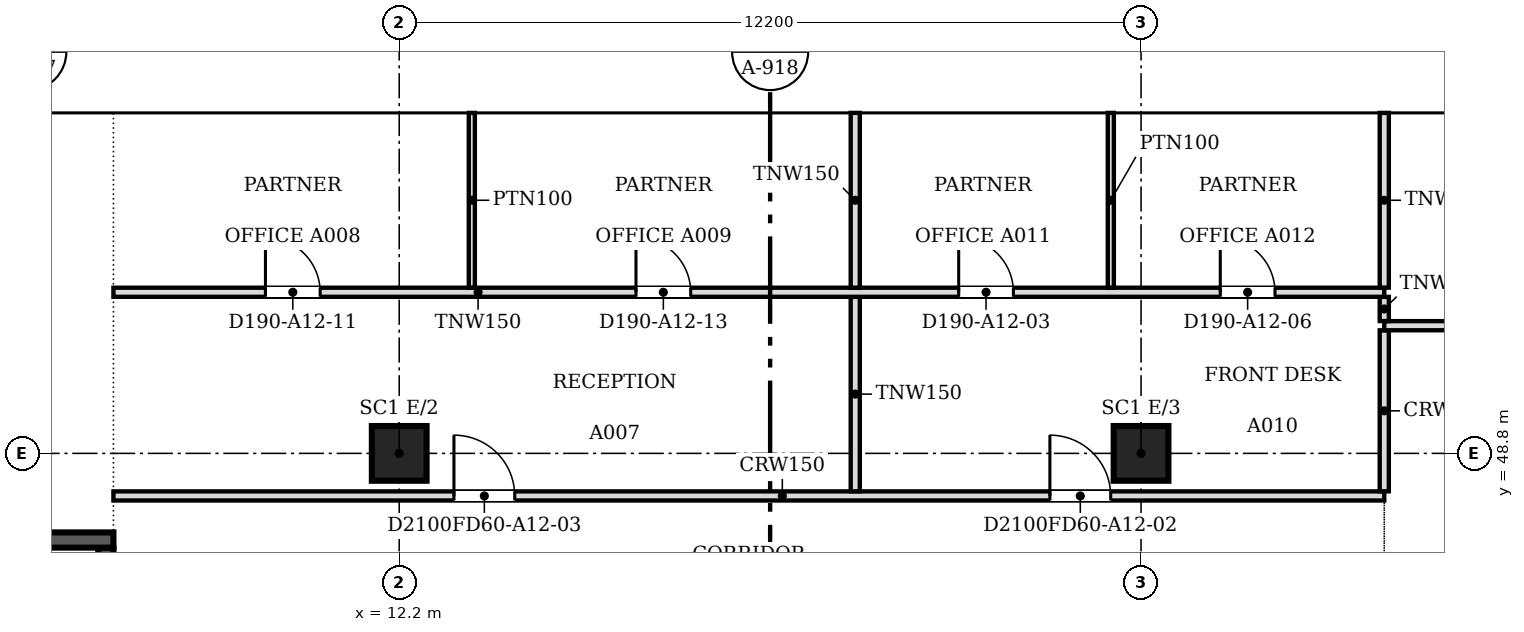
"""IFC4 building model, lengths in metres.
Left out: names, types, materials, properties, quantities, classifications, styles, units other than length and angle.
Written with IfcOpenShell. Run it as: python <this file> out.ifc"""

import sys

from ifc_helpers import new_model, si_unit, direction, frame, frame_2d, origin, origin_2d, place, context, subcontext, project, spatial, polyline, rectangle, outline, extrude, faceted_brep, source, transform, mapped, element, fill, save


model = new_model("IFC4")
c1 = context("Model", 3, precision=1e-05, world=origin(), true_north=direction((0.0, 1.0)))
c2 = subcontext(c1, "Body", "Model", "MODEL_VIEW")
j1 = project(units=[si_unit("LENGTHUNIT", "METRE"), si_unit("PLANEANGLEUNIT", "RADIAN")], contexts=[c1])
p1 = place(None, origin())
s1 = spatial("IfcSite", under=j1, at=p1, CompositionType="ELEMENT")
p2 = place(p1, origin())
s2 = spatial("IfcBuilding", under=s1, at=p2, CompositionType="ELEMENT")
p3 = place(p2, frame((0.0, 0.0, 139.2)))
s3 = spatial("IfcBuildingStorey", under=s2, at=p3, CompositionType="ELEMENT", Elevation=139.2)
for number, where, z_axis, x_axis in (
    (1, (12.2, 48.8, 0.0), (0.0, 0.0, 1.0), (1.0, 0.0, 0.0)),
    (2, (24.4, 48.8, 0.0), (0.0, 0.0, 1.0), (1.0, 0.0, 0.0)),
):
    element("IfcColumn", number, at=place(p3, frame(where, z_axis=z_axis, x_axis=x_axis)), inside=s3, PredefinedType="COLUMN", context=c2, shape_type="SweptSolid", body=[
        extrude(rectangle(XDim=0.9, YDim=0.9, at=origin_2d()), origin(), (0.0, 0.0, 1.0), 3.6),
    ])
m1 = source(origin(), c2, "Body", "SweptSolid", [
    extrude(outline(polyline([(3.05, 0.0), (6.1, 3.8), (3.05, 7.6), (0.0, 3.8), (3.05, 0.0)])), frame((0.0, 0.25, 0.0), z_axis=(0.0, -1.0, 0.0), x_axis=(1.0, 0.0, 0.0)), (0.0, 0.0, 1.0), 0.5),
])
p4 = place(p3, frame((30.5, 54.65, -3.8), z_axis=(0.0, 0.0, 1.0), x_axis=(-1.0, 0.0, 0.0)))
e3 = element("IfcWall", 3, at=p4, inside=s3, PredefinedType="SOLIDWALL", context=c2, shape_type="MappedRepresentation", body=[
    mapped(m1, transform((0.0, 0.0, 0.0), scale=1.0)),
])
m2 = source(origin(), c2, "Body", "SweptSolid", [
    extrude(outline(polyline([(3.05, 0.399), (5.78, 3.8), (3.05, 7.201), (0.321, 3.8), (3.05, 0.399)])), frame((0.0, 0.26, 0.0), z_axis=(0.0, -1.0, 0.0), x_axis=(1.0, 0.0, 0.0)), (0.0, 0.0, 1.0), 0.52),
])
p5 = place(p4, origin())
e4 = element("IfcOpeningElement", 4, at=p5, cuts=e3, PredefinedType="OPENING", context=c2, shape_type="MappedRepresentation", body=[
    mapped(m2, transform((0.0, 0.0, 0.0), scale=1.0)),
])
m3 = source(origin(), c2, "Body", "Brep", [
    faceted_brep([(3.05, -0.25, 0.0), (6.1, -0.25, 3.8), (6.1, -0.25, 3.8), (3.05, -0.25, 7.6), (0.0, -0.25, 3.8), (0.0, 0.25, 3.8), (3.05, 0.25, 7.6), (6.1, 0.25, 3.8), (6.1, 0.25, 3.8), (3.05, 0.25, 0.0)], [[[0, 1, 2, 3, 4]], [[5, 6, 7, 8, 9]], [[9, 8, 1, 0]], [[7, 6, 3, 2]], [[6, 5, 4, 3]], [[5, 9, 0, 4]], [[1, 8, 7, 2]]]),
])
p6 = place(p3, frame((24.4, 54.65, -3.8), z_axis=(0.0, 0.0, 1.0), x_axis=(-1.0, 0.0, 0.0)))
e5 = element("IfcWall", 5, at=p6, inside=s3, PredefinedType="SOLIDWALL", context=c2, shape_type="MappedRepresentation", body=[
    mapped(m3, transform((0.0, 0.0, 0.0), scale=1.0)),
])
p7 = place(p6, origin())
e6 = element("IfcOpeningElement", 6, at=p7, cuts=e5, PredefinedType="OPENING", context=c2, shape_type="MappedRepresentation", body=[
    mapped(m2, transform((0.0, 0.0, 0.0), scale=1.0)),
])
p8 = place(p3, frame((18.3, 54.65, -3.8), z_axis=(0.0, 0.0, 1.0), x_axis=(-1.0, 0.0, 0.0)))
e7 = element("IfcWall", 7, at=p8, inside=s3, PredefinedType="SOLIDWALL", context=c2, shape_type="MappedRepresentation", body=[
    mapped(m1, transform((0.0, 0.0, 0.0), scale=1.0)),
])
p9 = place(p8, origin())
e8 = element("IfcOpeningElement", 8, at=p9, cuts=e7, PredefinedType="OPENING", context=c2, shape_type="MappedRepresentation", body=[
    mapped(m2, transform((0.0, 0.0, 0.0), scale=1.0)),
])
m4 = source(origin(), c2, "Body", "Brep", [
    faceted_brep([(3.05, -0.25, 0.0), (6.053, -0.25, 3.8), (3.05, -0.25, 7.6), (0.0, -0.25, 3.8), (0.0, 0.25, 3.8), (3.05, 0.25, 7.6), (6.007, 0.25, 3.859), (6.007, 0.25, 3.741), (3.05, 0.25, 0.0), (6.053, 0.0, 3.8)], [[[0, 1, 2, 3]], [[4, 5, 6, 7, 8]], [[8, 7, 9, 1, 0]], [[6, 5, 2, 1, 9]], [[5, 4, 3, 2]], [[4, 8, 0, 3]], [[9, 7, 6]]]),
])
p10 = place(p3, frame((12.2, 54.65, -3.8), z_axis=(0.0, 0.0, 1.0), x_axis=(-1.0, 0.0, 0.0)))
e9 = element("IfcWall", 9, at=p10, inside=s3, PredefinedType="SOLIDWALL", context=c2, shape_type="MappedRepresentation", body=[
    mapped(m4, transform((0.0, 0.0, 0.0), scale=1.0)),
])
m5 = source(origin(), c2, "Body", "SweptSolid", [
    extrude(outline(polyline([(3.049, 0.401), (5.735, 3.8), (3.049, 7.199), (0.321, 3.8), (3.049, 0.401)])), frame((0.0, 0.26, 0.0), z_axis=(0.0, -1.0, 0.0), x_axis=(1.0, 0.0, 0.0)), (0.0, 0.0, 1.0), 0.52),
])
p11 = place(p10, origin())
e10 = element("IfcOpeningElement", 10, at=p11, cuts=e9, PredefinedType="OPENING", context=c2, shape_type="MappedRepresentation", body=[
    mapped(m5, transform((0.0, 0.0, 0.0), scale=1.0)),
])
p12 = place(p2, frame((0.0, 0.0, 143.0)))
s4 = spatial("IfcBuildingStorey", under=s2, at=p12, CompositionType="ELEMENT", Elevation=143.0)
p13 = place(p12, frame((33.55, 54.65, -3.8), z_axis=(0.0, 0.0, 1.0), x_axis=(-1.0, 0.0, 0.0)))
e11 = element("IfcWall", 11, at=p13, inside=s4, PredefinedType="SOLIDWALL", context=c2, shape_type="MappedRepresentation", body=[
    mapped(m1, transform((0.0, 0.0, 0.0), scale=1.0)),
])
p14 = place(p13, origin())
e12 = element("IfcOpeningElement", 12, at=p14, cuts=e11, PredefinedType="OPENING", context=c2, shape_type="MappedRepresentation", body=[
    mapped(m2, transform((0.0, 0.0, 0.0), scale=1.0)),
])
p15 = place(p12, frame((27.45, 54.65, -3.8), z_axis=(0.0, 0.0, 1.0), x_axis=(-1.0, 0.0, 0.0)))
e13 = element("IfcWall", 13, at=p15, inside=s4, PredefinedType="SOLIDWALL", context=c2, shape_type="MappedRepresentation", body=[
    mapped(m3, transform((0.0, 0.0, 0.0), scale=1.0)),
])
p16 = place(p15, origin())
e14 = element("IfcOpeningElement", 14, at=p16, cuts=e13, PredefinedType="OPENING", context=c2, shape_type="MappedRepresentation", body=[
    mapped(m2, transform((0.0, 0.0, 0.0), scale=1.0)),
])
p17 = place(p12, frame((21.35, 54.65, -3.8), z_axis=(0.0, 0.0, 1.0), x_axis=(-1.0, 0.0, 0.0)))
e15 = element("IfcWall", 15, at=p17, inside=s4, PredefinedType="SOLIDWALL", context=c2, shape_type="MappedRepresentation", body=[
    mapped(m1, transform((0.0, 0.0, 0.0), scale=1.0)),
])
p18 = place(p17, origin())
e16 = element("IfcOpeningElement", 16, at=p18, cuts=e15, PredefinedType="OPENING", context=c2, shape_type="MappedRepresentation", body=[
    mapped(m2, transform((0.0, 0.0, 0.0), scale=1.0)),
])
p19 = place(p12, frame((15.25, 54.65, -3.8), z_axis=(0.0, 0.0, 1.0), x_axis=(-1.0, 0.0, 0.0)))
e17 = element("IfcWall", 17, at=p19, inside=s4, PredefinedType="SOLIDWALL", context=c2, shape_type="MappedRepresentation", body=[
    mapped(m1, transform((0.0, 0.0, 0.0), scale=1.0)),
])
p20 = place(p19, origin())
e18 = element("IfcOpeningElement", 18, at=p20, cuts=e17, PredefinedType="OPENING", context=c2, shape_type="MappedRepresentation", body=[
    mapped(m2, transform((0.0, 0.0, 0.0), scale=1.0)),
])
m6 = source(origin(), c2, "Body", "Brep", [
    faceted_brep([(3.003, -0.25, 0.0), (3.05, -0.25, 0.06), (3.05, -0.25, 7.54), (3.003, -0.25, 7.6), (0.0, -0.25, 3.8), (0.0, 0.25, 3.8), (2.957, 0.25, 7.541), (2.957, 0.25, 0.059), (3.003, 0.0, 0.0), (3.003, 0.0, 7.6)], [[[0, 1, 2, 3, 4]], [[5, 6, 7]], [[1, 0, 8]], [[9, 3, 2]], [[6, 5, 4, 3, 9]], [[5, 7, 8, 0, 4]], [[1, 8, 7, 6, 9, 2]]]),
])
p21 = place(p12, frame((9.15, 54.65, -3.8), z_axis=(0.0, 0.0, 1.0), x_axis=(-1.0, 0.0, 0.0)))
e19 = element("IfcWall", 19, at=p21, inside=s4, PredefinedType="SOLIDWALL", context=c2, shape_type="MappedRepresentation", body=[
    mapped(m6, transform((0.0, 0.0, 0.0), scale=1.0)),
])
m7 = source(origin(), c2, "Body", "SweptSolid", [
    extrude(outline(polyline([(2.803, 6.944), (0.319, 3.8), (2.803, 0.656), (2.803, 6.944)])), frame((0.0, 0.26, 0.0), z_axis=(0.0, -1.0, 0.0), x_axis=(1.0, 0.0, 0.0)), (0.0, 0.0, 1.0), 0.52),
])
p22 = place(p21, origin())
e20 = element("IfcOpeningElement", 20, at=p22, cuts=e19, PredefinedType="OPENING", context=c2, shape_type="MappedRepresentation", body=[
    mapped(m7, transform((0.0, 0.0, 0.0), scale=1.0)),
])
p23 = place(p3, frame((3.6, 47.375, 0.0), z_axis=(0.0, 0.0, 1.0), x_axis=(1.0, 0.0, 0.0)))
e21 = element("IfcWall", 21, at=p23, inside=s3, PredefinedType="SOLIDWALL", context=c2, shape_type="SweptSolid", body=[
    extrude(rectangle(XDim=3.9, YDim=0.25, at=frame_2d((1.95, 0.0))), origin(), (0.0, 0.0, 1.0), 3.8),
])
p24 = place(p3, frame((7.375, 47.25, 0.0), z_axis=(0.0, 0.0, 1.0), x_axis=(0.0, -1.0, 0.0)))
e22 = element("IfcWall", 22, at=p24, inside=s3, PredefinedType="SOLIDWALL", context=c2, shape_type="SweptSolid", body=[
    extrude(rectangle(XDim=8.0, YDim=0.25, at=frame_2d((4.0, 0.0))), origin(), (0.0, 0.0, 1.0), 3.8),
])
m8 = source(origin(), c2, "Body", "SweptSolid", [
    extrude(rectangle(XDim=1.2, YDim=2.1, at=frame_2d((0.6, 1.05))), frame((0.0, 0.135, 0.0), z_axis=(0.0, -1.0, 0.0), x_axis=(1.0, 0.0, 0.0)), (0.0, 0.0, 1.0), 0.27),
])
p25 = place(p24, frame((0.15, 0.0, 0.0)))
e23 = element("IfcOpeningElement", 23, at=p25, cuts=e22, PredefinedType="OPENING", context=c2, shape_type="MappedRepresentation", body=[
    mapped(m8, transform((0.0, 0.0, 0.0), scale=1.0)),
])
p26 = place(p3, frame((7.5, 48.1, 0.0), z_axis=(0.0, 0.0, 1.0), x_axis=(1.0, 0.0, 0.0)))
e24 = element("IfcWall", 24, at=p26, inside=s3, PredefinedType="PARTITIONING", context=c2, shape_type="SweptSolid", body=[
    extrude(rectangle(XDim=20.9, YDim=0.15, at=frame_2d((10.45, 0.0))), origin(), (0.0, 0.0, 1.0), 3.067),
])
m9 = source(origin(), c2, "Body", "SweptSolid", [
    extrude(rectangle(XDim=1.0, YDim=2.1, at=frame_2d((0.5, 1.05))), frame((0.0, 0.085, 0.0), z_axis=(0.0, -1.0, 0.0), x_axis=(1.0, 0.0, 0.0)), (0.0, 0.0, 1.0), 0.17),
])
p27 = place(p26, frame((15.401, 0.0, 0.0)))
e25 = element("IfcOpeningElement", 25, at=p27, cuts=e24, PredefinedType="OPENING", context=c2, shape_type="MappedRepresentation", body=[
    mapped(m9, transform((0.0, 0.0, 0.0), scale=1.0)),
])
p28 = place(p26, frame((5.6, 0.0, 0.0)))
e26 = element("IfcOpeningElement", 26, at=p28, cuts=e24, PredefinedType="OPENING", context=c2, shape_type="MappedRepresentation", body=[
    mapped(m9, transform((0.0, 0.0, 0.0), scale=1.0)),
])
p29 = place(p3, frame((19.7, 48.176, 0.0), z_axis=(0.0, 0.0, 1.0), x_axis=(0.0, 1.0, 0.0)))
e27 = element("IfcWall", 27, at=p29, inside=s3, PredefinedType="PARTITIONING", context=c2, shape_type="SweptSolid", body=[
    extrude(rectangle(XDim=3.198, YDim=0.15, at=frame_2d((1.599, 0.0))), origin(), (0.0, 0.0, 1.0), 3.067),
])
p30 = place(p3, frame((28.4, 48.176, 0.0), z_axis=(0.0, 0.0, 1.0), x_axis=(0.0, 1.0, 0.0)))
e28 = element("IfcWall", 28, at=p30, inside=s3, PredefinedType="PARTITIONING", context=c2, shape_type="SweptSolid", body=[
    extrude(rectangle(XDim=2.648, YDim=0.15, at=frame_2d((1.324, 0.0))), origin(), (0.0, 0.0, 1.0), 3.067),
])
p31 = place(p3, frame((28.4, 50.9, 0.0), z_axis=(0.0, 0.0, 1.0), x_axis=(1.0, 0.0, 0.0)))
e29 = element("IfcWall", 29, at=p31, inside=s3, PredefinedType="PARTITIONING", context=c2, shape_type="SweptSolid", body=[
    extrude(rectangle(XDim=31.254, YDim=0.15, at=frame_2d((15.627, 0.0))), origin(), (0.0, 0.0, 1.0), 3.067),
])
m10 = source(origin(), c2, "Body", "SweptSolid", [
    extrude(rectangle(XDim=0.9, YDim=2.1, at=frame_2d((0.45, 1.05))), frame((0.0, 0.085, 0.0), z_axis=(0.0, -1.0, 0.0), x_axis=(1.0, 0.0, 0.0)), (0.0, 0.0, 1.0), 0.17),
])
p32 = place(p31, frame((5.6, 0.0, 0.0)))
e30 = element("IfcOpeningElement", 30, at=p32, cuts=e29, PredefinedType="OPENING", context=c2, shape_type="MappedRepresentation", body=[
    mapped(m10, transform((0.0, 0.0, 0.0), scale=1.0)),
])
p33 = place(p31, frame((21.3, 0.0, 0.0)))
e31 = element("IfcOpeningElement", 31, at=p33, cuts=e29, PredefinedType="OPENING", context=c2, shape_type="MappedRepresentation", body=[
    mapped(m10, transform((0.0, 0.0, 0.0), scale=1.0)),
])
p34 = place(p3, frame((28.4, 50.976, 0.0), z_axis=(0.0, 0.0, 1.0), x_axis=(0.0, 1.0, 0.0)))
e32 = element("IfcWall", 32, at=p34, inside=s3, PredefinedType="PARTITIONING", context=c2, shape_type="SweptSolid", body=[
    extrude(rectangle(XDim=0.398, YDim=0.15, at=frame_2d((0.199, 0.0))), origin(), (0.0, 0.0, 1.0), 3.067),
])
p35 = place(p3, frame((7.5, 51.45, 0.0), z_axis=(0.0, 0.0, 1.0), x_axis=(1.0, 0.0, 0.0)))
e33 = element("IfcWall", 33, at=p35, inside=s3, PredefinedType="PARTITIONING", context=c2, shape_type="SweptSolid", body=[
    extrude(rectangle(XDim=20.9, YDim=0.15, at=frame_2d((10.45, 0.0))), origin(), (0.0, 0.0, 1.0), 3.067),
])
p36 = place(p35, frame((13.901, 0.0, 0.0)))
e34 = element("IfcOpeningElement", 34, at=p36, cuts=e33, PredefinedType="OPENING", context=c2, shape_type="MappedRepresentation", body=[
    mapped(m10, transform((0.0, 0.0, 0.0), scale=1.0)),
])
p37 = place(p35, frame((18.203, 0.0, 0.0)))
e35 = element("IfcOpeningElement", 35, at=p37, cuts=e33, PredefinedType="OPENING", context=c2, shape_type="MappedRepresentation", body=[
    mapped(m10, transform((0.0, 0.0, 0.0), scale=1.0)),
])
p38 = place(p35, frame((2.5, 0.0, 0.0)))
e36 = element("IfcOpeningElement", 36, at=p38, cuts=e33, PredefinedType="OPENING", context=c2, shape_type="MappedRepresentation", body=[
    mapped(m10, transform((0.0, 0.0, 0.0), scale=1.0)),
])
p39 = place(p35, frame((8.594, 0.0, 0.0)))
e37 = element("IfcOpeningElement", 37, at=p39, cuts=e33, PredefinedType="OPENING", context=c2, shape_type="MappedRepresentation", body=[
    mapped(m10, transform((0.0, 0.0, 0.0), scale=1.0)),
])
p40 = place(p3, frame((13.394, 51.526, 0.0), z_axis=(0.0, 0.0, 1.0), x_axis=(0.0, 1.0, 0.0)))
e38 = element("IfcWall", 38, at=p40, inside=s3, PredefinedType="PARTITIONING", context=c2, shape_type="SweptSolid", body=[
    extrude(rectangle(XDim=2.874, YDim=0.1, at=frame_2d((1.437, 0.0))), origin(), (0.0, 0.0, 1.0), 3.067),
])
p41 = place(p3, frame((19.7, 51.526, 0.0), z_axis=(0.0, 0.0, 1.0), x_axis=(0.0, 1.0, 0.0)))
e39 = element("IfcWall", 39, at=p41, inside=s3, PredefinedType="PARTITIONING", context=c2, shape_type="SweptSolid", body=[
    extrude(rectangle(XDim=2.874, YDim=0.15, at=frame_2d((1.437, 0.0))), origin(), (0.0, 0.0, 1.0), 3.067),
])
p42 = place(p3, frame((23.903, 51.526, 0.0), z_axis=(0.0, 0.0, 1.0), x_axis=(0.0, 1.0, 0.0)))
e40 = element("IfcWall", 40, at=p42, inside=s3, PredefinedType="PARTITIONING", context=c2, shape_type="SweptSolid", body=[
    extrude(rectangle(XDim=2.874, YDim=0.1, at=frame_2d((1.437, 0.0))), origin(), (0.0, 0.0, 1.0), 3.067),
])
p43 = place(p3, frame((28.4, 51.526, 0.0), z_axis=(0.0, 0.0, 1.0), x_axis=(0.0, 1.0, 0.0)))
e41 = element("IfcWall", 41, at=p43, inside=s3, PredefinedType="PARTITIONING", context=c2, shape_type="SweptSolid", body=[
    extrude(rectangle(XDim=2.874, YDim=0.15, at=frame_2d((1.437, 0.0))), origin(), (0.0, 0.0, 1.0), 3.067),
])
m11 = source(origin(), c2, "Body", "SweptSolid", [
    extrude(rectangle(XDim=0.9, YDim=2.1, at=frame_2d((0.45, 1.05))), frame((0.0, 0.025, 0.0), z_axis=(0.0, -1.0, 0.0), x_axis=(1.0, 0.0, 0.0)), (0.0, 0.0, 1.0), 0.05),
])
p44 = place(p36, origin())
e42 = element("IfcDoor", 42, at=p44, inside=s3, OperationType="SINGLE_SWING_LEFT", PredefinedType="DOOR", context=c2, shape_type="MappedRepresentation", body=[
    mapped(m11, transform((0.0, 0.0, 0.0), scale=1.0)),
])
fill(e34, e42)
p45 = place(p37, origin())
e43 = element("IfcDoor", 43, at=p45, inside=s3, OperationType="SINGLE_SWING_LEFT", PredefinedType="DOOR", context=c2, shape_type="MappedRepresentation", body=[
    mapped(m11, transform((0.0, 0.0, 0.0), scale=1.0)),
])
fill(e35, e43)
p46 = place(p38, origin())
e44 = element("IfcDoor", 44, at=p46, inside=s3, OperationType="SINGLE_SWING_LEFT", PredefinedType="DOOR", context=c2, shape_type="MappedRepresentation", body=[
    mapped(m11, transform((0.0, 0.0, 0.0), scale=1.0)),
])
fill(e36, e44)
p47 = place(p39, origin())
e45 = element("IfcDoor", 45, at=p47, inside=s3, OperationType="SINGLE_SWING_LEFT", PredefinedType="DOOR", context=c2, shape_type="MappedRepresentation", body=[
    mapped(m11, transform((0.0, 0.0, 0.0), scale=1.0)),
])
fill(e37, e45)
m12 = source(origin(), c2, "Body", "SweptSolid", [
    extrude(rectangle(XDim=1.0, YDim=2.1, at=frame_2d((0.5, 1.05))), frame((0.0, 0.025, 0.0), z_axis=(0.0, -1.0, 0.0), x_axis=(1.0, 0.0, 0.0)), (0.0, 0.0, 1.0), 0.05),
])
p48 = place(p27, origin())
e46 = element("IfcDoor", 46, at=p48, inside=s3, OperationType="SINGLE_SWING_LEFT", PredefinedType="DOOR", context=c2, shape_type="MappedRepresentation", body=[
    mapped(m12, transform((0.0, 0.0, 0.0), scale=1.0)),
])
fill(e25, e46)
p49 = place(p28, origin())
e47 = element("IfcDoor", 47, at=p49, inside=s3, OperationType="SINGLE_SWING_LEFT", PredefinedType="DOOR", context=c2, shape_type="MappedRepresentation", body=[
    mapped(m12, transform((0.0, 0.0, 0.0), scale=1.0)),
])
fill(e26, e47)
save(model, sys.argv[1])
